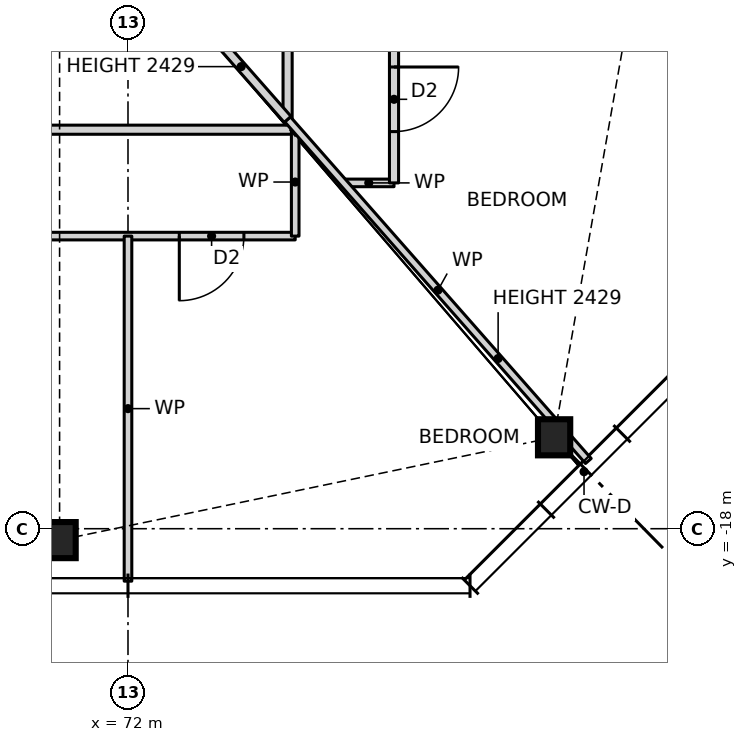
"""IFC4 building model, lengths in metres.
Left out: names, types, materials, properties, quantities, classifications, styles, units other than length and angle.
Written with IfcOpenShell. Run it as: python <this file> out.ifc"""

import sys

from ifc_helpers import new_model, si_unit, direction, frame, frame_2d, origin, origin_2d, place, context, subcontext, project, spatial, rectangle, i_section, extrude, element, fill, save


model = new_model("IFC4")
c1 = context("Model", 3, precision=1e-05, world=origin(), true_north=direction((0.0, 1.0)))
c2 = subcontext(c1, "Body", "Model", "MODEL_VIEW")
j1 = project(units=[si_unit("LENGTHUNIT", "METRE"), si_unit("PLANEANGLEUNIT", "RADIAN")], contexts=[c1])
p1 = place(None, origin())
s1 = spatial("IfcSite", under=j1, at=p1, CompositionType="ELEMENT")
p2 = place(p1, origin())
s2 = spatial("IfcBuilding", under=s1, at=p2, CompositionType="ELEMENT")
p3 = place(p2, frame((0.0, 0.0, 43.0)))
s3 = spatial("IfcBuildingStorey", under=s2, at=p3, CompositionType="ELEMENT", Elevation=43.0)
for number, where, z_axis, x_axis in (
    (1, (71.1, -18.15, 0.0), (0.0, 0.0, 1.0), (1.0, 0.0, 0.0)),
    (2, (77.606, -16.797, 0.0), (0.0, 0.0, 1.0), (1.0, 0.0, 0.0)),
):
    element("IfcColumn", number, at=place(p3, frame(where, z_axis=z_axis, x_axis=x_axis)), inside=s3, PredefinedType="COLUMN", context=c2, shape_type="SweptSolid", body=[
        extrude(i_section(OverallWidth=0.424, OverallDepth=0.475, WebThickness=0.048, FlangeThickness=0.077, at=origin_2d()), origin(), (0.0, 0.0, 1.0), 3.5),
    ])
p4 = place(p3, frame((63.0, -14.15, 0.0), z_axis=(0.0, 0.0, 1.0), x_axis=(1.0, 0.0, 0.0)))
e3 = element("IfcWall", 3, at=p4, inside=s3, PredefinedType="PARTITIONING", context=c2, shape_type="SweptSolid", body=[
    extrude(rectangle(XDim=11.2, YDim=0.1, at=frame_2d((5.6, 0.0))), origin(), (0.0, 0.0, 1.0), 3.27),
])
p5 = place(p4, frame((1.825, 0.0, 0.0)))
e4 = element("IfcOpeningElement", 4, at=p5, cuts=e3, PredefinedType="OPENING", context=c2, shape_type="SweptSolid", body=[
    extrude(rectangle(XDim=0.85, YDim=2.1, at=frame_2d((0.425, 1.05))), frame((0.0, 0.06, 0.0), z_axis=(0.0, -1.0, 0.0), x_axis=(1.0, 0.0, 0.0)), (0.0, 0.0, 1.0), 0.12),
])
p6 = place(p4, frame((6.325, 0.0, 0.0)))
e5 = element("IfcOpeningElement", 5, at=p6, cuts=e3, PredefinedType="OPENING", context=c2, shape_type="SweptSolid", body=[
    extrude(rectangle(XDim=0.85, YDim=2.1, at=frame_2d((0.425, 1.05))), frame((0.0, 0.06, 0.0), z_axis=(0.0, -1.0, 0.0), x_axis=(1.0, 0.0, 0.0)), (0.0, 0.0, 1.0), 0.12),
])
p7 = place(p4, frame((9.675, 0.0, 0.0)))
e6 = element("IfcOpeningElement", 6, at=p7, cuts=e3, PredefinedType="OPENING", context=c2, shape_type="SweptSolid", body=[
    extrude(rectangle(XDim=0.85, YDim=2.1, at=frame_2d((0.425, 1.05))), frame((0.0, 0.06, 0.0), z_axis=(0.0, -1.0, 0.0), x_axis=(1.0, 0.0, 0.0)), (0.0, 0.0, 1.0), 0.12),
])
p8 = place(p3, frame((74.836, -13.45, 0.0), z_axis=(0.0, 0.0, 1.0), x_axis=(1.0, 0.0, 0.0)))
e7 = element("IfcWall", 7, at=p8, inside=s3, PredefinedType="PARTITIONING", context=c2, shape_type="SweptSolid", body=[
    extrude(rectangle(XDim=0.664, YDim=0.1, at=frame_2d((0.332, 0.0))), origin(), (0.0, 0.0, 1.0), 3.27),
])
p9 = place(p3, frame((54.0, -12.75, 0.0), z_axis=(0.0, 0.0, 1.0), x_axis=(1.0, 0.0, 0.0)))
e8 = element("IfcWall", 8, at=p9, inside=s3, PredefinedType="PARTITIONING", context=c2, shape_type="SweptSolid", body=[
    extrude(rectangle(XDim=20.2, YDim=0.12, at=frame_2d((10.1, 0.0))), origin(), (0.0, 0.0, 1.0), 3.27),
])
p10 = place(p9, frame((1.375, 0.0, 0.0)))
e9 = element("IfcOpeningElement", 9, at=p10, cuts=e8, PredefinedType="OPENING", context=c2, shape_type="SweptSolid", body=[
    extrude(rectangle(XDim=0.85, YDim=2.1, at=frame_2d((0.425, 1.05))), frame((0.0, 0.07, 0.0), z_axis=(0.0, -1.0, 0.0), x_axis=(1.0, 0.0, 0.0)), (0.0, 0.0, 1.0), 0.14),
])
p11 = place(p9, frame((4.575, 0.0, 0.0)))
e10 = element("IfcOpeningElement", 10, at=p11, cuts=e8, PredefinedType="OPENING", context=c2, shape_type="SweptSolid", body=[
    extrude(rectangle(XDim=0.85, YDim=2.1, at=frame_2d((0.425, 1.05))), frame((0.0, 0.07, 0.0), z_axis=(0.0, -1.0, 0.0), x_axis=(1.0, 0.0, 0.0)), (0.0, 0.0, 1.0), 0.14),
])
p12 = place(p9, frame((10.225, 0.0, 0.0)))
e11 = element("IfcOpeningElement", 11, at=p12, cuts=e8, PredefinedType="OPENING", context=c2, shape_type="SweptSolid", body=[
    extrude(rectangle(XDim=0.85, YDim=2.1, at=frame_2d((0.425, 1.05))), frame((0.0, 0.07, 0.0), z_axis=(0.0, -1.0, 0.0), x_axis=(1.0, 0.0, 0.0)), (0.0, 0.0, 1.0), 0.14),
])
p13 = place(p9, frame((15.825, 0.0, 0.0)))
e12 = element("IfcOpeningElement", 12, at=p13, cuts=e8, PredefinedType="OPENING", context=c2, shape_type="SweptSolid", body=[
    extrude(rectangle(XDim=0.85, YDim=2.1, at=frame_2d((0.425, 1.05))), frame((0.0, 0.07, 0.0), z_axis=(0.0, -1.0, 0.0), x_axis=(1.0, 0.0, 0.0)), (0.0, 0.0, 1.0), 0.14),
])
p14 = place(p3, frame((75.5, -13.45, 0.0), z_axis=(0.0, 0.0, 1.0), x_axis=(0.0, 1.0, 0.0)))
e13 = element("IfcWall", 13, at=p14, inside=s3, PredefinedType="PARTITIONING", context=c2, shape_type="SweptSolid", body=[
    extrude(rectangle(XDim=6.7, YDim=0.12, at=frame_2d((3.35, 0.0))), origin(), (0.0, 0.0, 1.0), 3.27),
])
p15 = place(p14, frame((5.225, 0.0, 0.0)))
e14 = element("IfcOpeningElement", 14, at=p15, cuts=e13, PredefinedType="OPENING", context=c2, shape_type="SweptSolid", body=[
    extrude(rectangle(XDim=0.85, YDim=2.1, at=frame_2d((0.425, 1.05))), frame((0.0, 0.07, 0.0), z_axis=(0.0, -1.0, 0.0), x_axis=(1.0, 0.0, 0.0)), (0.0, 0.0, 1.0), 0.14),
])
p16 = place(p14, frame((0.675, 0.0, 0.0)))
e15 = element("IfcOpeningElement", 15, at=p16, cuts=e13, PredefinedType="OPENING", context=c2, shape_type="SweptSolid", body=[
    extrude(rectangle(XDim=0.85, YDim=2.1, at=frame_2d((0.425, 1.05))), frame((0.0, 0.07, 0.0), z_axis=(0.0, -1.0, 0.0), x_axis=(1.0, 0.0, 0.0)), (0.0, 0.0, 1.0), 0.14),
])
p17 = place(p3, frame((74.2, -14.15, 0.0), z_axis=(0.0, 0.0, 1.0), x_axis=(0.0, 1.0, 0.0)))
e16 = element("IfcWall", 16, at=p17, inside=s3, PredefinedType="PARTITIONING", context=c2, shape_type="SweptSolid", body=[
    extrude(rectangle(XDim=1.423, YDim=0.1, at=frame_2d((0.711, 0.0))), origin(), (0.0, 0.0, 1.0), 3.27),
])
p18 = place(p3, frame((74.1, -12.614, 0.0), z_axis=(0.0, 0.0, 1.0), x_axis=(0.0, 1.0, 0.0)))
e17 = element("IfcWall", 17, at=p18, inside=s3, PredefinedType="PARTITIONING", context=c2, shape_type="SweptSolid", body=[
    extrude(rectangle(XDim=25.228, YDim=0.12, at=frame_2d((12.614, 0.0))), origin(), (0.0, 0.0, 1.0), 3.27),
])
p19 = place(p18, frame((7.239, 0.0, 0.0)))
e18 = element("IfcOpeningElement", 18, at=p19, cuts=e17, PredefinedType="OPENING", context=c2, shape_type="SweptSolid", body=[
    extrude(rectangle(XDim=0.85, YDim=2.1, at=frame_2d((0.425, 1.05))), frame((0.0, 0.07, 0.0), z_axis=(0.0, -1.0, 0.0), x_axis=(1.0, 0.0, 0.0)), (0.0, 0.0, 1.0), 0.14),
])
p20 = place(p18, frame((10.439, 0.0, 0.0)))
e19 = element("IfcOpeningElement", 19, at=p20, cuts=e17, PredefinedType="OPENING", context=c2, shape_type="SweptSolid", body=[
    extrude(rectangle(XDim=0.85, YDim=2.1, at=frame_2d((0.425, 1.05))), frame((0.0, 0.07, 0.0), z_axis=(0.0, -1.0, 0.0), x_axis=(1.0, 0.0, 0.0)), (0.0, 0.0, 1.0), 0.14),
])
p21 = place(p18, frame((2.507, 0.0, 0.0)))
e20 = element("IfcOpeningElement", 20, at=p21, cuts=e17, PredefinedType="OPENING", context=c2, shape_type="SweptSolid", body=[
    extrude(rectangle(XDim=0.85, YDim=2.1, at=frame_2d((0.425, 1.05))), frame((0.0, 0.07, 0.0), z_axis=(0.0, -1.0, 0.0), x_axis=(1.0, 0.0, 0.0)), (0.0, 0.0, 1.0), 0.14),
])
p22 = place(p18, frame((16.639, 0.0, 0.0)))
e21 = element("IfcOpeningElement", 21, at=p22, cuts=e17, PredefinedType="OPENING", context=c2, shape_type="SweptSolid", body=[
    extrude(rectangle(XDim=0.85, YDim=2.1, at=frame_2d((0.425, 1.05))), frame((0.0, 0.07, 0.0), z_axis=(0.0, -1.0, 0.0), x_axis=(1.0, 0.0, 0.0)), (0.0, 0.0, 1.0), 0.14),
])
p23 = place(p18, frame((21.821, 0.0, 0.0)))
e22 = element("IfcOpeningElement", 22, at=p23, cuts=e17, PredefinedType="OPENING", context=c2, shape_type="SweptSolid", body=[
    extrude(rectangle(XDim=0.85, YDim=2.1, at=frame_2d((0.425, 1.05))), frame((0.0, 0.07, 0.0), z_axis=(0.0, -1.0, 0.0), x_axis=(1.0, 0.0, 0.0)), (0.0, 0.0, 1.0), 0.14),
])
p24 = place(p3, frame((72.0, -18.69, 0.0), z_axis=(0.0, 0.0, 1.0), x_axis=(0.0, 1.0, 0.0)))
e23 = element("IfcWall", 23, at=p24, inside=s3, PredefinedType="PARTITIONING", context=c2, shape_type="SweptSolid", body=[
    extrude(rectangle(XDim=4.54, YDim=0.1, at=frame_2d((2.27, 0.0))), origin(), (0.0, 0.0, 1.0), 3.27),
])
p25 = place(p3, frame((78.057, -17.109, 0.0), z_axis=(0.0, 0.0, 1.0), x_axis=(-0.660775837956, 0.750583301156, 0.0)))
e24 = element("IfcWall", 24, at=p25, inside=s3, PredefinedType="PARTITIONING", context=c2, shape_type="SweptSolid", body=[
    extrude(rectangle(XDim=5.989, YDim=0.1, at=frame_2d((2.994, 0.0))), origin(), (0.0, 0.0, 1.0), 2.429),
])
p26 = place(p3, frame((74.1, -12.614, 0.0), z_axis=(0.0, 0.0, 1.0), x_axis=(-0.660767161141, 0.750590939699, 0.0)))
e25 = element("IfcWall", 25, at=p26, inside=s3, PredefinedType="PARTITIONING", context=c2, shape_type="SweptSolid", body=[
    extrude(rectangle(XDim=3.082, YDim=0.12, at=frame_2d((1.541, 0.0))), origin(), (0.0, 0.0, 1.0), 2.429),
])
p27 = place(p7, frame((0.85, 0.0, 0.0), z_axis=(0.0, 0.0, 1.0), x_axis=(-1.0, 0.0, 0.0)))
e26 = element("IfcDoor", 26, at=p27, inside=s3, OperationType="SINGLE_SWING_RIGHT", PredefinedType="DOOR", context=c2, shape_type="SweptSolid", body=[
    extrude(rectangle(XDim=0.85, YDim=2.1, at=frame_2d((0.425, 1.05))), frame((0.0, 0.025, 0.0), z_axis=(0.0, -1.0, 0.0), x_axis=(1.0, 0.0, 0.0)), (0.0, 0.0, 1.0), 0.05),
])
fill(e6, e26)
p28 = place(p16, frame((0.85, 0.0, 0.0), z_axis=(0.0, 0.0, 1.0), x_axis=(-1.0, 0.0, 0.0)))
e27 = element("IfcDoor", 27, at=p28, inside=s3, OperationType="SINGLE_SWING_LEFT", PredefinedType="DOOR", context=c2, shape_type="SweptSolid", body=[
    extrude(rectangle(XDim=0.85, YDim=2.1, at=frame_2d((0.425, 1.05))), frame((0.0, 0.025, 0.0), z_axis=(0.0, -1.0, 0.0), x_axis=(1.0, 0.0, 0.0)), (0.0, 0.0, 1.0), 0.05),
])
fill(e15, e27)
save(model, sys.argv[1])
